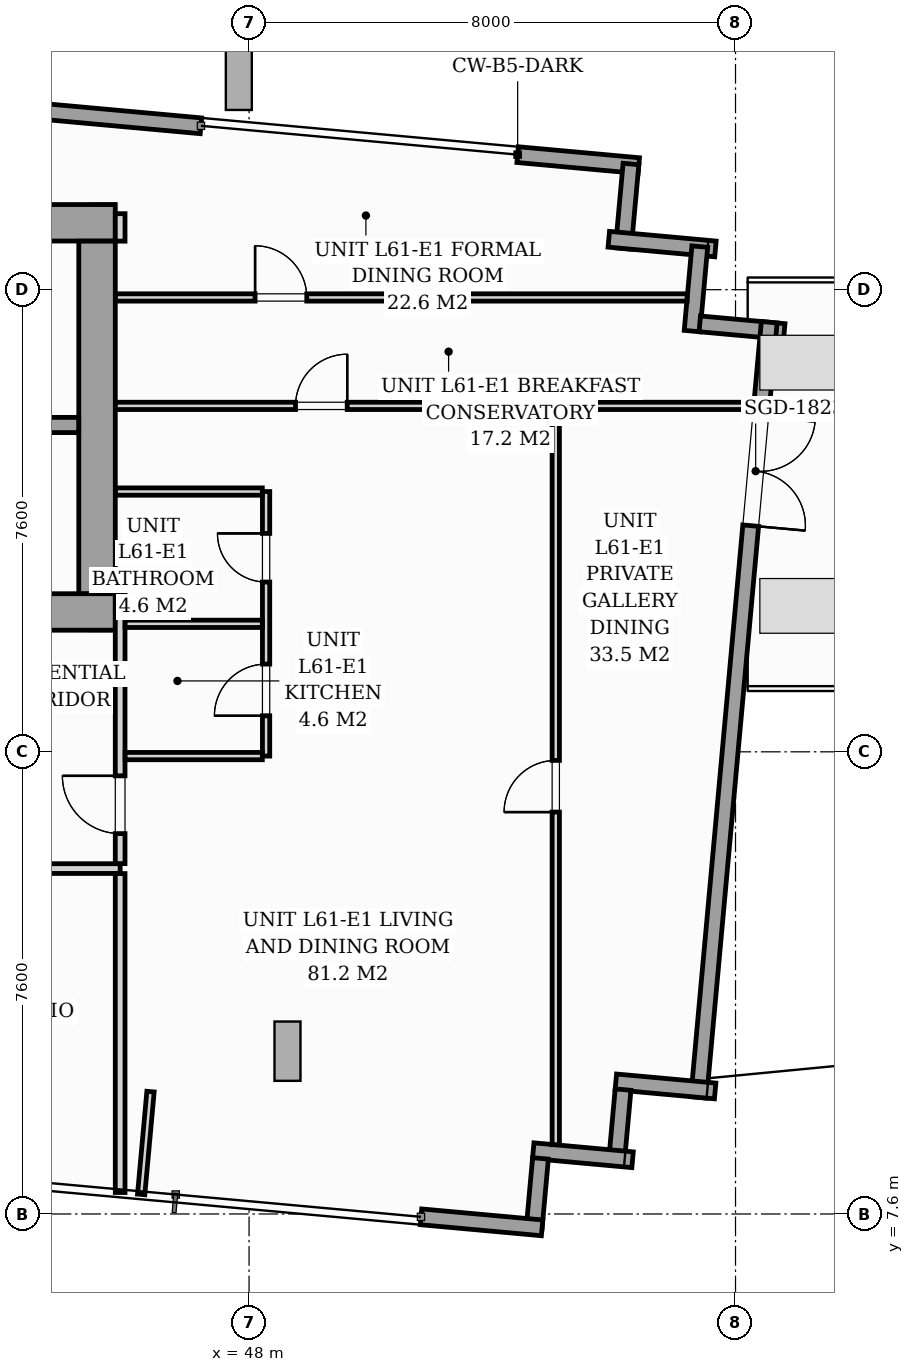
"""IFC4 building model, lengths in metres.
Left out: names, types, materials, properties, quantities, classifications, styles, units other than length and angle.
Written with IfcOpenShell. Run it as: python <this file> out.ifc"""

import sys

from ifc_helpers import new_model, si_unit, direction, frame, frame_2d, origin, origin_2d, place, context, subcontext, project, spatial, rectangle, i_section, extrude, source, transform, mapped, element, fill, save


model = new_model("IFC4")
c1 = context("Model", 3, precision=1e-05, world=origin(), true_north=direction((0.0, 1.0)))
c2 = subcontext(c1, "Body", "Model", "MODEL_VIEW")
j1 = project(units=[si_unit("LENGTHUNIT", "METRE"), si_unit("PLANEANGLEUNIT", "RADIAN")], contexts=[c1])
p1 = place(None, origin())
s1 = spatial("IfcSite", under=j1, at=p1, CompositionType="ELEMENT")
p2 = place(p1, origin())
s2 = spatial("IfcBuilding", under=s1, at=p2, CompositionType="ELEMENT")
p3 = place(p2, frame((0.0, 0.0, 211.4)))
s3 = spatial("IfcBuildingStorey", under=s2, at=p3, CompositionType="ELEMENT", Elevation=211.4)
m1 = source(origin(), c2, "Body", "SweptSolid", [
    extrude(i_section(OverallWidth=0.409, OverallDepth=0.425, WebThickness=0.033, FlangeThickness=0.052, FilletRadius=0.018, at=origin_2d()), origin(), (0.0, 0.0, 1.0), 5.196),
])
for number, where, z_axis, x_axis in (
    (1, (45.6, 17.4, 0.002), (0.0, 0.0, 1.0), (1.0, 0.0, 0.0)),
    (2, (45.6, 24.0, 0.002), (0.0, 0.0, 1.0), (1.0, 0.0, 0.0)),
):
    element("IfcColumn", number, at=place(p3, frame(where, z_axis=z_axis, x_axis=x_axis)), inside=s3, PredefinedType="PILASTER", context=c2, shape_type="MappedRepresentation", body=[
        mapped(m1, transform((0.0, 0.0, 0.0), scale=1.0)),
    ])
m2 = source(origin(), c2, "Body", "SweptSolid", [
    extrude(i_section(OverallWidth=0.427, OverallDepth=0.976, WebThickness=0.031, FlangeThickness=0.056, FilletRadius=0.024, at=origin_2d()), origin(), (0.0, 0.0, 1.0), 9.321),
])
p4 = place(p3, frame((50.494, 10.518, 0.201), z_axis=(-0.87551198847, -0.113200790205, 0.46974923006), x_axis=(0.465871238968, 0.060235602801, 0.882799898538)))
e3 = element("IfcColumn", 3, at=p4, inside=s3, PredefinedType="COLUMN", context=c2, shape_type="MappedRepresentation", body=[
    mapped(m2, transform((0.0, 0.0, 0.0), scale=1.0)),
])
m3 = source(origin(), c2, "Body", "SweptSolid", [
    extrude(i_section(OverallWidth=0.427, OverallDepth=0.976, WebThickness=0.031, FlangeThickness=0.056, FilletRadius=0.024, at=origin_2d()), origin(), (0.0, 0.0, 1.0), 10.475),
])
p5 = place(p3, frame((61.338, 11.482, 0.206), z_axis=(-0.867809442626, -0.270297480894, 0.416948489757), x_axis=(0.398085430207, 0.12399206978, 0.908930116615)))
e4 = element("IfcColumn", 4, at=p5, inside=s3, PredefinedType="COLUMN", context=c2, shape_type="MappedRepresentation", body=[
    mapped(m3, transform((0.0, 0.0, 0.0), scale=1.0)),
])
m4 = source(origin(), c2, "Body", "SweptSolid", [
    extrude(i_section(OverallWidth=0.427, OverallDepth=0.976, WebThickness=0.031, FlangeThickness=0.056, FilletRadius=0.024, at=origin_2d()), origin(), (0.0, 0.0, 1.0), 7.153),
])
p6 = place(p3, frame((49.106, 26.489, 0.18), z_axis=(-0.771990042934, -0.149018857876, 0.61791969835), x_axis=(0.606719472398, 0.117116332854, 0.786241213872)))
e5 = element("IfcColumn", 5, at=p6, inside=s3, PredefinedType="COLUMN", context=c2, shape_type="MappedRepresentation", body=[
    mapped(m4, transform((0.0, 0.0, 0.0), scale=1.0)),
])
m5 = source(origin(), c2, "Body", "SweptSolid", [
    extrude(i_section(OverallWidth=0.427, OverallDepth=0.976, WebThickness=0.031, FlangeThickness=0.056, FilletRadius=0.024, at=origin_2d()), origin(), (0.0, 0.0, 1.0), 8.498),
])
p7 = place(p3, frame((59.944, 27.432, 0.195), z_axis=(-0.757792414849, -0.398603751461, 0.516590461893), x_axis=(0.457198576371, 0.240489432373, 0.856232617156)))
e6 = element("IfcColumn", 6, at=p7, inside=s3, PredefinedType="COLUMN", context=c2, shape_type="MappedRepresentation", body=[
    mapped(m5, transform((0.0, 0.0, 0.0), scale=1.0)),
])
m6 = source(origin(), c2, "Body", "SweptSolid", [
    extrude(i_section(OverallWidth=0.427, OverallDepth=0.976, WebThickness=0.031, FlangeThickness=0.056, FilletRadius=0.024, at=origin_2d()), origin(), (0.0, 0.0, 1.0), 9.578),
])
p8 = place(p3, frame((63.01, 19.665, 0.202), z_axis=(-0.810430605075, -0.366750819206, 0.456832650945), x_axis=(0.416199264808, 0.18834607228, 0.889552656693)))
e7 = element("IfcColumn", 7, at=p8, inside=s3, PredefinedType="COLUMN", context=c2, shape_type="MappedRepresentation", body=[
    mapped(m6, transform((0.0, 0.0, 0.0), scale=1.0)),
])
p9 = place(p3, frame((42.508, 25.923, 0.0), z_axis=(0.0, 0.0, 1.0), x_axis=(0.995889813869, -0.090573056879, 0.0)))
e8 = element("IfcWall", 8, at=p9, inside=s3, PredefinedType="STANDARD", context=c2, shape_type="SweptSolid", body=[
    extrude(rectangle(XDim=4.72, YDim=0.26, at=frame_2d((2.36, 0.0))), origin(), (0.0, 0.0, 1.0), 4.78),
])
p10 = place(p3, frame((52.417, 25.021, 0.0), z_axis=(0.0, 0.0, 1.0), x_axis=(0.995878183707, -0.09070084463, 0.0)))
e9 = element("IfcWall", 9, at=p10, inside=s3, PredefinedType="STANDARD", context=c2, shape_type="SweptSolid", body=[
    extrude(rectangle(XDim=2.0, YDim=0.26, at=frame_2d((1.0, 0.0))), origin(), (0.0, 0.0, 1.0), 4.78),
])
p11 = place(p3, frame((54.281, 24.866, 0.0), z_axis=(0.0, 0.0, 1.0), x_axis=(-0.090661991521, -0.995881721538, 0.0)))
e10 = element("IfcWall", 10, at=p11, inside=s3, PredefinedType="STANDARD", context=c2, shape_type="SweptSolid", body=[
    extrude(rectangle(XDim=1.395, YDim=0.26, at=frame_2d((0.698, 0.0))), origin(), (0.0, 0.0, 1.0), 4.78),
])
p12 = place(p3, frame((53.916, 23.629, 0.0), z_axis=(0.0, 0.0, 1.0), x_axis=(0.995881835921, -0.090660735063, 0.0)))
e11 = element("IfcWall", 11, at=p12, inside=s3, PredefinedType="STANDARD", context=c2, shape_type="SweptSolid", body=[
    extrude(rectangle(XDim=1.761, YDim=0.26, at=frame_2d((0.881, 0.0))), origin(), (0.0, 0.0, 1.0), 4.78),
])
for number, where, z_axis, x_axis in (
    (12, (55.412, 23.508, 0.0), (0.0, 0.0, 1.0), (-0.091, -0.996, 0.0)),
    (13, (55.412, 22.238, 0.0), (0.0, 0.0, 1.0), (0.996, -0.091, 0.0)),
):
    element("IfcWall", number, at=place(p3, frame(where, z_axis=z_axis, x_axis=x_axis)), inside=s3, PredefinedType="STANDARD", context=c2, shape_type="SweptSolid", body=[
        extrude(rectangle(XDim=1.395, YDim=0.26, at=frame_2d((0.698, 0.0))), origin(), (0.0, 0.0, 1.0), 4.78),
    ])
p13 = place(p3, frame((56.554, 22.265, 0.0), z_axis=(0.0, 0.0, 1.0), x_axis=(-0.09063721027, -0.995883977236, 0.0)))
e14 = element("IfcWall", 14, at=p13, inside=s3, PredefinedType="STANDARD", context=c2, shape_type="SweptSolid", body=[
    extrude(rectangle(XDim=12.8, YDim=0.26, at=frame_2d((6.4, 0.0))), origin(), (0.0, 0.0, 1.0), 4.78),
])
p14 = place(p13, frame((1.559, 0.0, 0.0)))
e15 = element("IfcOpeningElement", 15, at=p14, cuts=e14, PredefinedType="OPENING", context=c2, shape_type="SweptSolid", body=[
    extrude(rectangle(XDim=1.8, YDim=2.1, at=frame_2d((0.9, 1.05))), frame((0.0, 0.14, 0.0), z_axis=(0.0, -1.0, 0.0), x_axis=(1.0, 0.0, 0.0)), (0.0, 0.0, 1.0), 0.28),
])
p15 = place(p3, frame((55.665, 9.623, 0.0), z_axis=(0.0, 0.0, 1.0), x_axis=(-0.995880993864, 0.090669984342, 0.0)))
e16 = element("IfcWall", 16, at=p15, inside=s3, PredefinedType="STANDARD", context=c2, shape_type="SweptSolid", body=[
    extrude(rectangle(XDim=1.64, YDim=0.26, at=frame_2d((0.82, 0.0))), origin(), (0.0, 0.0, 1.0), 4.78),
])
p16 = place(p3, frame((54.151, 9.646, 0.0), z_axis=(0.0, 0.0, 1.0), x_axis=(-0.090650594353, -0.995882759035, 0.0)))
e17 = element("IfcWall", 17, at=p16, inside=s3, PredefinedType="STANDARD", context=c2, shape_type="SweptSolid", body=[
    extrude(rectangle(XDim=1.15, YDim=0.26, at=frame_2d((0.575, 0.0))), origin(), (0.0, 0.0, 1.0), 4.78),
])
p17 = place(p3, frame((54.307, 8.492, 0.0), z_axis=(0.0, 0.0, 1.0), x_axis=(-0.995882217569, 0.090656542676, 0.0)))
e18 = element("IfcWall", 18, at=p17, inside=s3, PredefinedType="STANDARD", context=c2, shape_type="SweptSolid", body=[
    extrude(rectangle(XDim=1.64, YDim=0.26, at=frame_2d((0.82, 0.0))), origin(), (0.0, 0.0, 1.0), 4.78),
])
p18 = place(p3, frame((52.792, 8.514, 0.0), z_axis=(0.0, 0.0, 1.0), x_axis=(-0.090650594353, -0.995882759035, 0.0)))
e19 = element("IfcWall", 19, at=p18, inside=s3, PredefinedType="STANDARD", context=c2, shape_type="SweptSolid", body=[
    extrude(rectangle(XDim=1.15, YDim=0.26, at=frame_2d((0.575, 0.0))), origin(), (0.0, 0.0, 1.0), 4.78),
])
p19 = place(p3, frame((52.819, 7.372, 0.0), z_axis=(0.0, 0.0, 1.0), x_axis=(-0.995878183707, 0.09070084463, 0.0)))
e20 = element("IfcWall", 20, at=p19, inside=s3, PredefinedType="STANDARD", context=c2, shape_type="SweptSolid", body=[
    extrude(rectangle(XDim=2.0, YDim=0.26, at=frame_2d((1.0, 0.0))), origin(), (0.0, 0.0, 1.0), 4.78),
])
p20 = place(p3, frame((26.2, 17.5, 0.0), z_axis=(0.0, 0.0, 1.0), x_axis=(1.0, 0.0, 0.0)))
e21 = element("IfcWall", 21, at=p20, inside=s3, PredefinedType="SHEAR", context=c2, shape_type="SweptSolid", body=[
    extrude(rectangle(XDim=19.6, YDim=0.6, at=frame_2d((9.8, 0.0))), origin(), (0.0, 0.0, 1.0), 5.2),
])
p21 = place(p20, frame((0.95, 0.0, 0.0)))
e22 = element("IfcOpeningElement", 22, at=p21, cuts=e21, PredefinedType="OPENING", context=c2, shape_type="SweptSolid", body=[
    extrude(rectangle(XDim=0.95, YDim=2.06, at=frame_2d((0.475, 1.03))), frame((0.0, 0.31, 0.0), z_axis=(0.0, -1.0, 0.0), x_axis=(1.0, 0.0, 0.0)), (0.0, 0.0, 1.0), 0.62),
])
p22 = place(p20, frame((9.38, 0.0, 0.0)))
e23 = element("IfcOpeningElement", 23, at=p22, cuts=e21, PredefinedType="OPENING", context=c2, shape_type="SweptSolid", body=[
    extrude(rectangle(XDim=0.9, YDim=2.06, at=frame_2d((0.45, 1.03))), frame((0.0, 0.31, 0.0), z_axis=(0.0, -1.0, 0.0), x_axis=(1.0, 0.0, 0.0)), (0.0, 0.0, 1.0), 0.62),
])
p23 = place(p20, frame((17.55, 0.0, 0.0)))
e24 = element("IfcOpeningElement", 24, at=p23, cuts=e21, PredefinedType="OPENING", context=c2, shape_type="SweptSolid", body=[
    extrude(rectangle(XDim=0.95, YDim=2.06, at=frame_2d((0.475, 1.03))), frame((0.0, 0.31, 0.0), z_axis=(0.0, -1.0, 0.0), x_axis=(1.0, 0.0, 0.0)), (0.0, 0.0, 1.0), 0.62),
])
p24 = place(p3, frame((26.2, 23.9, 0.0), z_axis=(0.0, 0.0, 1.0), x_axis=(1.0, 0.0, 0.0)))
e25 = element("IfcWall", 25, at=p24, inside=s3, PredefinedType="SHEAR", context=c2, shape_type="SweptSolid", body=[
    extrude(rectangle(XDim=19.6, YDim=0.6, at=frame_2d((9.8, 0.0))), origin(), (0.0, 0.0, 1.0), 5.2),
])
p25 = place(p3, frame((45.5, 17.802, 0.0), z_axis=(0.0, 0.0, 1.0), x_axis=(0.0, 1.0, 0.0)))
e26 = element("IfcWall", 26, at=p25, inside=s3, PredefinedType="SHEAR", context=c2, shape_type="SweptSolid", body=[
    extrude(rectangle(XDim=5.796, YDim=0.6, at=frame_2d((2.898, 0.0))), origin(), (0.0, 0.0, 1.0), 5.2),
])
p26 = place(p3, frame((37.05, 20.575, 0.0), z_axis=(0.0, 0.0, 1.0), x_axis=(1.0, 0.0, 0.0)))
e27 = element("IfcWall", 27, at=p26, inside=s3, PredefinedType="SOLIDWALL", context=c2, shape_type="SweptSolid", body=[
    extrude(rectangle(XDim=8.148, YDim=0.25, at=frame_2d((4.074, 0.0))), origin(), (0.0, 0.0, 1.0), 5.2),
])
p27 = place(p26, frame((6.6, 0.0, 0.0)))
e28 = element("IfcOpeningElement", 28, at=p27, cuts=e27, PredefinedType="OPENING", context=c2, shape_type="SweptSolid", body=[
    extrude(rectangle(XDim=0.95, YDim=2.06, at=frame_2d((0.475, 1.03))), frame((0.0, 0.135, 0.0), z_axis=(0.0, -1.0, 0.0), x_axis=(1.0, 0.0, 0.0)), (0.0, 0.0, 1.0), 0.27),
])
p28 = place(p3, frame((26.12, 13.28, 0.0), z_axis=(0.0, 0.0, 1.0), x_axis=(1.0, 0.0, 0.0)))
e29 = element("IfcWall", 29, at=p28, inside=s3, PredefinedType="PARTITIONING", context=c2, shape_type="SweptSolid", body=[
    extrude(rectangle(XDim=19.76, YDim=0.16, at=frame_2d((9.88, 0.0))), origin(), (0.0, 0.0, 1.0), 4.345),
])
p29 = place(p28, frame((5.345, 0.0, 0.0)))
e30 = element("IfcOpeningElement", 30, at=p29, cuts=e29, PredefinedType="OPENING", context=c2, shape_type="SweptSolid", body=[
    extrude(rectangle(XDim=0.95, YDim=2.06, at=frame_2d((0.475, 1.03))), frame((0.0, 0.09, 0.0), z_axis=(0.0, -1.0, 0.0), x_axis=(1.0, 0.0, 0.0)), (0.0, 0.0, 1.0), 0.18),
])
p30 = place(p28, frame((16.52, 0.0, 0.0)))
e31 = element("IfcOpeningElement", 31, at=p30, cuts=e29, PredefinedType="OPENING", context=c2, shape_type="SweptSolid", body=[
    extrude(rectangle(XDim=0.95, YDim=2.06, at=frame_2d((0.475, 1.03))), frame((0.0, 0.09, 0.0), z_axis=(0.0, -1.0, 0.0), x_axis=(1.0, 0.0, 0.0)), (0.0, 0.0, 1.0), 0.18),
])
p31 = place(p3, frame((45.88, 7.953, 0.0), z_axis=(0.0, 0.0, 1.0), x_axis=(0.0, 1.0, 0.0)))
e32 = element("IfcWall", 32, at=p31, inside=s3, PredefinedType="PARTITIONING", context=c2, shape_type="SweptSolid", body=[
    extrude(rectangle(XDim=5.245, YDim=0.16, at=frame_2d((2.623, 0.0))), origin(), (0.0, 0.0, 1.0), 4.78),
])
p32 = place(p3, frame((45.88, 13.362, 0.0), z_axis=(0.0, 0.0, 1.0), x_axis=(0.0, 1.0, 0.0)))
e33 = element("IfcWall", 33, at=p32, inside=s3, PredefinedType="PARTITIONING", context=c2, shape_type="SweptSolid", body=[
    extrude(rectangle(XDim=4.44, YDim=0.16, at=frame_2d((2.22, 0.0))), origin(), (0.0, 0.0, 1.0), 4.78),
])
p33 = place(p32, frame((0.493, 0.0, 0.0)))
e34 = element("IfcOpeningElement", 34, at=p33, cuts=e33, PredefinedType="OPENING", context=c2, shape_type="SweptSolid", body=[
    extrude(rectangle(XDim=0.95, YDim=2.06, at=frame_2d((0.475, 1.03))), frame((0.0, 0.09, 0.0), z_axis=(0.0, -1.0, 0.0), x_axis=(1.0, 0.0, 0.0)), (0.0, 0.0, 1.0), 0.18),
])
p34 = place(p3, frame((45.88, 23.598, 0.0), z_axis=(0.0, 0.0, 1.0), x_axis=(0.0, 1.0, 0.0)))
e35 = element("IfcWall", 35, at=p34, inside=s3, PredefinedType="PARTITIONING", context=c2, shape_type="SweptSolid", body=[
    extrude(rectangle(XDim=0.452, YDim=0.16, at=frame_2d((0.226, 0.0))), origin(), (0.0, 0.0, 1.0), 4.78),
])
p35 = place(p3, frame((48.28, 15.13, 0.0), z_axis=(0.0, 0.0, 1.0), x_axis=(0.0, 1.0, 0.0)))
e36 = element("IfcWall", 36, at=p35, inside=s3, PredefinedType="PARTITIONING", context=c2, shape_type="SweptSolid", body=[
    extrude(rectangle(XDim=4.35, YDim=0.12, at=frame_2d((2.175, 0.0))), origin(), (0.0, 0.0, 1.0), 4.78),
])
p36 = place(p35, frame((0.663, 0.0, 0.0)))
e37 = element("IfcOpeningElement", 37, at=p36, cuts=e36, PredefinedType="OPENING", context=c2, shape_type="SweptSolid", body=[
    extrude(rectangle(XDim=0.85, YDim=2.05, at=frame_2d((0.425, 1.025))), frame((0.0, 0.07, 0.0), z_axis=(0.0, -1.0, 0.0), x_axis=(1.0, 0.0, 0.0)), (0.0, 0.0, 1.0), 0.14),
])
p37 = place(p35, frame((2.862, 0.0, 0.0)))
e38 = element("IfcOpeningElement", 38, at=p37, cuts=e36, PredefinedType="OPENING", context=c2, shape_type="SweptSolid", body=[
    extrude(rectangle(XDim=0.8, YDim=2.02, at=frame_2d((0.4, 1.01))), frame((0.0, 0.07, 0.0), z_axis=(0.0, -1.0, 0.0), x_axis=(1.0, 0.0, 0.0)), (0.0, 0.0, 1.0), 0.14),
])
p38 = place(p3, frame((45.962, 17.305, 0.0), z_axis=(0.0, 0.0, 1.0), x_axis=(1.0, 0.0, 0.0)))
e39 = element("IfcWall", 39, at=p38, inside=s3, PredefinedType="PARTITIONING", context=c2, shape_type="SweptSolid", body=[
    extrude(rectangle(XDim=2.256, YDim=0.12, at=frame_2d((1.128, 0.0))), origin(), (0.0, 0.0, 1.0), 4.122),
])
p39 = place(p3, frame((45.962, 15.13, 0.0), z_axis=(0.0, 0.0, 1.0), x_axis=(1.0, 0.0, 0.0)))
e40 = element("IfcWall", 40, at=p39, inside=s3, PredefinedType="PARTITIONING", context=c2, shape_type="SweptSolid", body=[
    extrude(rectangle(XDim=2.256, YDim=0.12, at=frame_2d((1.128, 0.0))), origin(), (0.0, 0.0, 1.0), 4.78),
])
p40 = place(p3, frame((45.802, 19.48, 0.0), z_axis=(0.0, 0.0, 1.0), x_axis=(1.0, 0.0, 0.0)))
e41 = element("IfcWall", 41, at=p40, inside=s3, PredefinedType="PARTITIONING", context=c2, shape_type="SweptSolid", body=[
    extrude(rectangle(XDim=2.416, YDim=0.12, at=frame_2d((1.208, 0.0))), origin(), (0.0, 0.0, 1.0), 4.78),
])
p41 = place(p3, frame((45.802, 22.672, 0.0), z_axis=(0.0, 0.0, 1.0), x_axis=(1.0, 0.0, 0.0)))
e42 = element("IfcWall", 42, at=p41, inside=s3, PredefinedType="PARTITIONING", context=c2, shape_type="SweptSolid", body=[
    extrude(rectangle(XDim=9.402, YDim=0.12, at=frame_2d((4.701, 0.0))), origin(), (0.0, 0.0, 1.0), 4.78),
])
p42 = place(p41, frame((2.297, 0.0, 0.0)))
e43 = element("IfcOpeningElement", 43, at=p42, cuts=e42, PredefinedType="OPENING", context=c2, shape_type="SweptSolid", body=[
    extrude(rectangle(XDim=0.85, YDim=2.05, at=frame_2d((0.425, 1.025))), frame((0.0, 0.07, 0.0), z_axis=(0.0, -1.0, 0.0), x_axis=(1.0, 0.0, 0.0)), (0.0, 0.0, 1.0), 0.14),
])
p43 = place(p3, frame((45.802, 20.889, 0.0), z_axis=(0.0, 0.0, 1.0), x_axis=(1.0, 0.0, 0.0)))
e44 = element("IfcWall", 44, at=p43, inside=s3, PredefinedType="PARTITIONING", context=c2, shape_type="SweptSolid", body=[
    extrude(rectangle(XDim=10.494, YDim=0.12, at=frame_2d((5.247, 0.0))), origin(), (0.0, 0.0, 1.0), 4.78),
])
p44 = place(p43, frame((2.962, 0.0, 0.0)))
e45 = element("IfcOpeningElement", 45, at=p44, cuts=e44, PredefinedType="OPENING", context=c2, shape_type="SweptSolid", body=[
    extrude(rectangle(XDim=0.85, YDim=2.05, at=frame_2d((0.425, 1.025))), frame((0.0, 0.07, 0.0), z_axis=(0.0, -1.0, 0.0), x_axis=(1.0, 0.0, 0.0)), (0.0, 0.0, 1.0), 0.14),
])
p45 = place(p3, frame((53.044, 8.739, 0.0), z_axis=(0.0, 0.0, 1.0), x_axis=(0.0, 1.0, 0.0)))
e46 = element("IfcWall", 46, at=p45, inside=s3, PredefinedType="PARTITIONING", context=c2, shape_type="SweptSolid", body=[
    extrude(rectangle(XDim=12.088, YDim=0.12, at=frame_2d((6.044, 0.0))), origin(), (0.0, 0.0, 1.0), 4.78),
])
p46 = place(p45, frame((5.47, 0.0, 0.0)))
e47 = element("IfcOpeningElement", 47, at=p46, cuts=e46, PredefinedType="OPENING", context=c2, shape_type="SweptSolid", body=[
    extrude(rectangle(XDim=0.85, YDim=2.05, at=frame_2d((0.425, 1.025))), frame((0.0, 0.07, 0.0), z_axis=(0.0, -1.0, 0.0), x_axis=(1.0, 0.0, 0.0)), (0.0, 0.0, 1.0), 0.14),
])
p47 = place(p3, frame((53.044, 20.951, 0.0), z_axis=(0.0, 0.0, 1.0), x_axis=(0.0, 1.0, 0.0)))
e48 = element("IfcWall", 48, at=p47, inside=s3, PredefinedType="PARTITIONING", context=c2, shape_type="SweptSolid", body=[
    extrude(rectangle(XDim=0.378, YDim=0.12, at=frame_2d((0.189, 0.0))), origin(), (0.0, 0.0, 1.0), 4.78),
])
p48 = place(p3, frame((46.379, 9.612, 0.0), z_axis=(0.0, 0.0, 1.0), x_axis=(-0.090613556002, -0.99588612977, 0.0)))
e49 = element("IfcWall", 49, at=p48, inside=s3, PredefinedType="PARTITIONING", context=c2, shape_type="SweptSolid", body=[
    extrude(rectangle(XDim=1.698, YDim=0.12, at=frame_2d((0.849, 0.0))), origin(), (0.0, 0.0, 1.0), 4.78),
])
m7 = source(origin(), c2, "Body", "SweptSolid", [
    extrude(rectangle(XDim=1.8, YDim=2.1, at=frame_2d((0.9, 1.05))), frame((0.0, 0.025, 0.0), z_axis=(0.0, -1.0, 0.0), x_axis=(1.0, 0.0, 0.0)), (0.0, 0.0, 1.0), 0.05),
])
p49 = place(p14, origin())
e50 = element("IfcDoor", 50, at=p49, inside=s3, OperationType="DOUBLE_DOOR_SINGLE_SWING", PredefinedType="DOOR", context=c2, shape_type="MappedRepresentation", body=[
    mapped(m7, transform((0.0, 0.0, 0.0), scale=1.0)),
])
fill(e15, e50)
m8 = source(origin(), c2, "Body", "SweptSolid", [
    extrude(rectangle(XDim=0.95, YDim=2.06, at=frame_2d((0.475, 1.03))), frame((0.0, 0.025, 0.0), z_axis=(0.0, -1.0, 0.0), x_axis=(1.0, 0.0, 0.0)), (0.0, 0.0, 1.0), 0.05),
])
p50 = place(p33, origin())
e51 = element("IfcDoor", 51, at=p50, inside=s3, OperationType="SINGLE_SWING_RIGHT", PredefinedType="DOOR", context=c2, shape_type="MappedRepresentation", body=[
    mapped(m8, transform((0.0, 0.0, 0.0), scale=1.0)),
])
fill(e34, e51)
m9 = source(origin(), c2, "Body", "SweptSolid", [
    extrude(rectangle(XDim=0.85, YDim=2.05, at=frame_2d((0.425, 1.025))), frame((0.0, 0.025, 0.0), z_axis=(0.0, -1.0, 0.0), x_axis=(1.0, 0.0, 0.0)), (0.0, 0.0, 1.0), 0.05),
])
p51 = place(p36, origin())
e52 = element("IfcDoor", 52, at=p51, inside=s3, OperationType="SINGLE_SWING_LEFT", PredefinedType="DOOR", context=c2, shape_type="MappedRepresentation", body=[
    mapped(m9, transform((0.0, 0.0, 0.0), scale=1.0)),
])
fill(e37, e52)
m10 = source(origin(), c2, "Body", "SweptSolid", [
    extrude(rectangle(XDim=0.8, YDim=2.02, at=frame_2d((0.4, 1.01))), frame((0.0, 0.025, 0.0), z_axis=(0.0, -1.0, 0.0), x_axis=(1.0, 0.0, 0.0)), (0.0, 0.0, 1.0), 0.05),
])
p52 = place(p37, origin())
e53 = element("IfcDoor", 53, at=p52, inside=s3, OperationType="SINGLE_SWING_RIGHT", PredefinedType="DOOR", context=c2, shape_type="MappedRepresentation", body=[
    mapped(m10, transform((0.0, 0.0, 0.0), scale=1.0)),
])
fill(e38, e53)
p53 = place(p42, origin())
e54 = element("IfcDoor", 54, at=p53, inside=s3, OperationType="SINGLE_SWING_LEFT", PredefinedType="DOOR", context=c2, shape_type="MappedRepresentation", body=[
    mapped(m9, transform((0.0, 0.0, 0.0), scale=1.0)),
])
fill(e43, e54)
p54 = place(p44, origin())
e55 = element("IfcDoor", 55, at=p54, inside=s3, OperationType="SINGLE_SWING_RIGHT", PredefinedType="DOOR", context=c2, shape_type="MappedRepresentation", body=[
    mapped(m9, transform((0.0, 0.0, 0.0), scale=1.0)),
])
fill(e45, e55)
p55 = place(p46, origin())
e56 = element("IfcDoor", 56, at=p55, inside=s3, OperationType="SINGLE_SWING_LEFT", PredefinedType="DOOR", context=c2, shape_type="MappedRepresentation", body=[
    mapped(m9, transform((0.0, 0.0, 0.0), scale=1.0)),
])
fill(e47, e56)
save(model, sys.argv[1])
